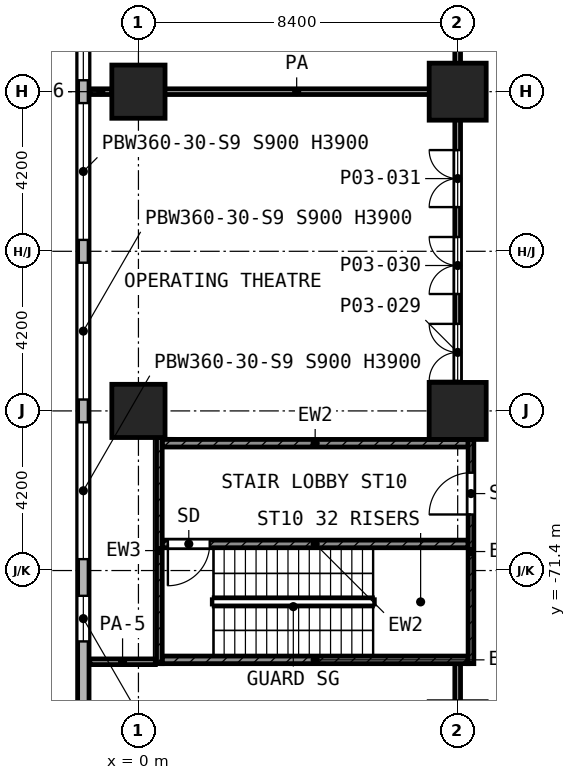
"""IFC4 building model, lengths in metres.
Left out: names, types, materials, properties, quantities, classifications, styles, units other than length and angle.
Written with IfcOpenShell. Run it as: python <this file> out.ifc"""

import sys

from ifc_helpers import new_model, si_unit, direction, frame, frame_2d, origin, origin_2d, place, context, subcontext, project, spatial, rectangle, extrude, element, fill, save


model = new_model("IFC4")
c1 = context("Model", 3, precision=1e-05, world=origin(), true_north=direction((0.0, 1.0)))
c2 = subcontext(c1, "Body", "Model", "MODEL_VIEW")
j1 = project(units=[si_unit("LENGTHUNIT", "METRE"), si_unit("PLANEANGLEUNIT", "RADIAN")], contexts=[c1])
p1 = place(None, origin())
s1 = spatial("IfcSite", under=j1, at=p1, CompositionType="ELEMENT")
p2 = place(p1, origin())
s2 = spatial("IfcBuilding", under=s1, at=p2, CompositionType="ELEMENT")
p3 = place(p2, frame((0.0, 0.0, 12.6)))
s3 = spatial("IfcBuildingStorey", under=s2, at=p3, CompositionType="ELEMENT", Elevation=12.6)
p4 = place(p3, frame((0.0, -58.8, 0.0), z_axis=(0.0, 0.0, 1.0), x_axis=(1.0, 0.0, 0.0)))
e1 = element("IfcColumn", 1, at=p4, inside=s3, PredefinedType="COLUMN", context=c2, shape_type="SweptSolid", body=[
    extrude(rectangle(XDim=1.4, YDim=1.4, at=origin_2d()), origin(), (0.0, 0.0, 1.0), 5.6),
])
p5 = place(p3, frame((8.4, -58.8, 0.0), z_axis=(0.0, 0.0, 1.0), x_axis=(1.0, 0.0, 0.0)))
e2 = element("IfcColumn", 2, at=p5, inside=s3, PredefinedType="COLUMN", context=c2, shape_type="SweptSolid", body=[
    extrude(rectangle(XDim=1.5, YDim=1.5, at=origin_2d()), origin(), (0.0, 0.0, 1.0), 5.6),
])
p6 = place(p3, frame((0.0, -67.2, 0.0), z_axis=(0.0, 0.0, 1.0), x_axis=(1.0, 0.0, 0.0)))
e3 = element("IfcColumn", 3, at=p6, inside=s3, PredefinedType="COLUMN", context=c2, shape_type="SweptSolid", body=[
    extrude(rectangle(XDim=1.4, YDim=1.4, at=origin_2d()), origin(), (0.0, 0.0, 1.0), 5.6),
])
p7 = place(p3, frame((8.4, -67.2, 0.0), z_axis=(0.0, 0.0, 1.0), x_axis=(1.0, 0.0, 0.0)))
e4 = element("IfcColumn", 4, at=p7, inside=s3, PredefinedType="COLUMN", context=c2, shape_type="SweptSolid", body=[
    extrude(rectangle(XDim=1.5, YDim=1.5, at=origin_2d()), origin(), (0.0, 0.0, 1.0), 5.6),
])
p8 = place(p3, frame((-1.45, -4.462, 0.0), z_axis=(0.0, 0.0, 1.0), x_axis=(0.0, -1.0, 0.0)))
e5 = element("IfcWall", 5, at=p8, inside=s3, PredefinedType="SOLIDWALL", context=c2, shape_type="SweptSolid", body=[
    extrude(rectangle(XDim=75.076, YDim=0.3, at=frame_2d((37.538, 0.0))), origin(), (0.0, 0.0, 1.0), 5.25),
])
p9 = place(p8, frame((0.738, 0.0, 0.9)))
e6 = element("IfcOpeningElement", 6, at=p9, cuts=e5, PredefinedType="OPENING", context=c2, shape_type="SweptSolid", body=[
    extrude(rectangle(XDim=2.4, YDim=3.0, at=frame_2d((1.2, 1.5))), frame((0.0, 0.16, 0.0), z_axis=(0.0, -1.0, 0.0), x_axis=(1.0, 0.0, 0.0)), (0.0, 0.0, 1.0), 0.32),
])
p10 = place(p8, frame((4.238, 0.0, 0.9)))
e7 = element("IfcOpeningElement", 7, at=p10, cuts=e5, PredefinedType="OPENING", context=c2, shape_type="SweptSolid", body=[
    extrude(rectangle(XDim=3.6, YDim=3.0, at=frame_2d((1.8, 1.5))), frame((0.0, 0.16, 0.0), z_axis=(0.0, -1.0, 0.0), x_axis=(1.0, 0.0, 0.0)), (0.0, 0.0, 1.0), 0.32),
])
p11 = place(p8, frame((8.438, 0.0, 0.9)))
e8 = element("IfcOpeningElement", 8, at=p11, cuts=e5, PredefinedType="OPENING", context=c2, shape_type="SweptSolid", body=[
    extrude(rectangle(XDim=3.6, YDim=3.0, at=frame_2d((1.8, 1.5))), frame((0.0, 0.16, 0.0), z_axis=(0.0, -1.0, 0.0), x_axis=(1.0, 0.0, 0.0)), (0.0, 0.0, 1.0), 0.32),
])
p12 = place(p8, frame((12.638, 0.0, 0.9)))
e9 = element("IfcOpeningElement", 9, at=p12, cuts=e5, PredefinedType="OPENING", context=c2, shape_type="SweptSolid", body=[
    extrude(rectangle(XDim=3.6, YDim=3.0, at=frame_2d((1.8, 1.5))), frame((0.0, 0.16, 0.0), z_axis=(0.0, -1.0, 0.0), x_axis=(1.0, 0.0, 0.0)), (0.0, 0.0, 1.0), 0.32),
])
p13 = place(p8, frame((16.838, 0.0, 0.9)))
e10 = element("IfcOpeningElement", 10, at=p13, cuts=e5, PredefinedType="OPENING", context=c2, shape_type="SweptSolid", body=[
    extrude(rectangle(XDim=3.6, YDim=3.0, at=frame_2d((1.8, 1.5))), frame((0.0, 0.16, 0.0), z_axis=(0.0, -1.0, 0.0), x_axis=(1.0, 0.0, 0.0)), (0.0, 0.0, 1.0), 0.32),
])
p14 = place(p8, frame((21.403, 0.0, 0.9)))
e11 = element("IfcOpeningElement", 11, at=p14, cuts=e5, PredefinedType="OPENING", context=c2, shape_type="SweptSolid", body=[
    extrude(rectangle(XDim=2.4, YDim=3.0, at=frame_2d((1.2, 1.5))), frame((0.0, 0.16, 0.0), z_axis=(0.0, -1.0, 0.0), x_axis=(1.0, 0.0, 0.0)), (0.0, 0.0, 1.0), 0.32),
])
p15 = place(p8, frame((25.238, 0.0, 0.9)))
e12 = element("IfcOpeningElement", 12, at=p15, cuts=e5, PredefinedType="OPENING", context=c2, shape_type="SweptSolid", body=[
    extrude(rectangle(XDim=3.6, YDim=3.0, at=frame_2d((1.8, 1.5))), frame((0.0, 0.16, 0.0), z_axis=(0.0, -1.0, 0.0), x_axis=(1.0, 0.0, 0.0)), (0.0, 0.0, 1.0), 0.32),
])
p16 = place(p8, frame((30.423, 0.0, 0.9)))
e13 = element("IfcOpeningElement", 13, at=p16, cuts=e5, PredefinedType="OPENING", context=c2, shape_type="SweptSolid", body=[
    extrude(rectangle(XDim=2.4, YDim=3.0, at=frame_2d((1.2, 1.5))), frame((0.0, 0.16, 0.0), z_axis=(0.0, -1.0, 0.0), x_axis=(1.0, 0.0, 0.0)), (0.0, 0.0, 1.0), 0.32),
])
p17 = place(p8, frame((33.638, 0.0, 0.9)))
e14 = element("IfcOpeningElement", 14, at=p17, cuts=e5, PredefinedType="OPENING", context=c2, shape_type="SweptSolid", body=[
    extrude(rectangle(XDim=3.6, YDim=3.0, at=frame_2d((1.8, 1.5))), frame((0.0, 0.16, 0.0), z_axis=(0.0, -1.0, 0.0), x_axis=(1.0, 0.0, 0.0)), (0.0, 0.0, 1.0), 0.32),
])
p18 = place(p8, frame((37.838, 0.0, 0.9)))
e15 = element("IfcOpeningElement", 15, at=p18, cuts=e5, PredefinedType="OPENING", context=c2, shape_type="SweptSolid", body=[
    extrude(rectangle(XDim=3.6, YDim=3.0, at=frame_2d((1.8, 1.5))), frame((0.0, 0.16, 0.0), z_axis=(0.0, -1.0, 0.0), x_axis=(1.0, 0.0, 0.0)), (0.0, 0.0, 1.0), 0.32),
])
p19 = place(p8, frame((42.038, 0.0, 0.9)))
e16 = element("IfcOpeningElement", 16, at=p19, cuts=e5, PredefinedType="OPENING", context=c2, shape_type="SweptSolid", body=[
    extrude(rectangle(XDim=3.6, YDim=3.0, at=frame_2d((1.8, 1.5))), frame((0.0, 0.16, 0.0), z_axis=(0.0, -1.0, 0.0), x_axis=(1.0, 0.0, 0.0)), (0.0, 0.0, 1.0), 0.32),
])
p20 = place(p8, frame((46.238, 0.0, 0.9)))
e17 = element("IfcOpeningElement", 17, at=p20, cuts=e5, PredefinedType="OPENING", context=c2, shape_type="SweptSolid", body=[
    extrude(rectangle(XDim=3.6, YDim=3.0, at=frame_2d((1.8, 1.5))), frame((0.0, 0.16, 0.0), z_axis=(0.0, -1.0, 0.0), x_axis=(1.0, 0.0, 0.0)), (0.0, 0.0, 1.0), 0.32),
])
p21 = place(p8, frame((50.438, 0.0, 0.9)))
e18 = element("IfcOpeningElement", 18, at=p21, cuts=e5, PredefinedType="OPENING", context=c2, shape_type="SweptSolid", body=[
    extrude(rectangle(XDim=3.6, YDim=3.0, at=frame_2d((1.8, 1.5))), frame((0.0, 0.16, 0.0), z_axis=(0.0, -1.0, 0.0), x_axis=(1.0, 0.0, 0.0)), (0.0, 0.0, 1.0), 0.32),
])
p22 = place(p8, frame((54.638, 0.0, 0.9)))
e19 = element("IfcOpeningElement", 19, at=p22, cuts=e5, PredefinedType="OPENING", context=c2, shape_type="SweptSolid", body=[
    extrude(rectangle(XDim=3.6, YDim=3.0, at=frame_2d((1.8, 1.5))), frame((0.0, 0.16, 0.0), z_axis=(0.0, -1.0, 0.0), x_axis=(1.0, 0.0, 0.0)), (0.0, 0.0, 1.0), 0.32),
])
p23 = place(p8, frame((58.838, 0.0, 0.9)))
e20 = element("IfcOpeningElement", 20, at=p23, cuts=e5, PredefinedType="OPENING", context=c2, shape_type="SweptSolid", body=[
    extrude(rectangle(XDim=3.6, YDim=3.0, at=frame_2d((1.8, 1.5))), frame((0.0, 0.16, 0.0), z_axis=(0.0, -1.0, 0.0), x_axis=(1.0, 0.0, 0.0)), (0.0, 0.0, 1.0), 0.32),
])
p24 = place(p8, frame((63.038, 0.0, 0.9)))
e21 = element("IfcOpeningElement", 21, at=p24, cuts=e5, PredefinedType="OPENING", context=c2, shape_type="SweptSolid", body=[
    extrude(rectangle(XDim=3.6, YDim=3.0, at=frame_2d((1.8, 1.5))), frame((0.0, 0.16, 0.0), z_axis=(0.0, -1.0, 0.0), x_axis=(1.0, 0.0, 0.0)), (0.0, 0.0, 1.0), 0.32),
])
p25 = place(p8, frame((67.603, 0.0, 0.9)))
e22 = element("IfcOpeningElement", 22, at=p25, cuts=e5, PredefinedType="OPENING", context=c2, shape_type="SweptSolid", body=[
    extrude(rectangle(XDim=1.2, YDim=3.0, at=frame_2d((0.6, 1.5))), frame((0.0, 0.16, 0.0), z_axis=(0.0, -1.0, 0.0), x_axis=(1.0, 0.0, 0.0)), (0.0, 0.0, 1.0), 0.32),
])
p26 = place(p8, frame((71.938, 0.0, 0.9)))
e23 = element("IfcOpeningElement", 23, at=p26, cuts=e5, PredefinedType="OPENING", context=c2, shape_type="SweptSolid", body=[
    extrude(rectangle(XDim=2.4, YDim=3.0, at=frame_2d((1.2, 1.5))), frame((0.0, 0.16, 0.0), z_axis=(0.0, -1.0, 0.0), x_axis=(1.0, 0.0, 0.0)), (0.0, 0.0, 1.0), 0.32),
])
p27 = place(p3, frame((0.55, -73.85, 0.0), z_axis=(0.0, 0.0, 1.0), x_axis=(0.0, 1.0, 0.0)))
e24 = element("IfcWall", 24, at=p27, inside=s3, PredefinedType="SHEAR", context=c2, shape_type="SweptSolid", body=[
    extrude(rectangle(XDim=5.95, YDim=0.15, at=frame_2d((2.975, 0.0))), origin(), (0.0, 0.0, 1.0), 5.25),
])
p28 = place(p3, frame((8.75, -73.85, 0.0), z_axis=(0.0, 0.0, 1.0), x_axis=(0.0, 1.0, 0.0)))
e25 = element("IfcWall", 25, at=p28, inside=s3, PredefinedType="SHEAR", context=c2, shape_type="SweptSolid", body=[
    extrude(rectangle(XDim=5.9, YDim=0.15, at=frame_2d((2.95, 0.0))), origin(), (0.0, 0.0, 1.0), 5.25),
])
p29 = place(p28, frame((3.925, 0.0, 0.0)))
e26 = element("IfcOpeningElement", 26, at=p29, cuts=e25, PredefinedType="OPENING", context=c2, shape_type="SweptSolid", body=[
    extrude(rectangle(XDim=1.1, YDim=2.1, at=frame_2d((0.55, 1.05))), frame((0.0, 0.085, 0.0), z_axis=(0.0, -1.0, 0.0), x_axis=(1.0, 0.0, 0.0)), (0.0, 0.0, 1.0), 0.17),
])
p30 = place(p3, frame((0.625, -73.75, 0.0), z_axis=(0.0, 0.0, 1.0), x_axis=(1.0, 0.0, 0.0)))
e27 = element("IfcWall", 27, at=p30, inside=s3, PredefinedType="SHEAR", context=c2, shape_type="SweptSolid", body=[
    extrude(rectangle(XDim=8.05, YDim=0.2, at=frame_2d((4.025, 0.0))), origin(), (0.0, 0.0, 1.0), 5.25),
])
p31 = place(p3, frame((0.625, -70.7, 0.0), z_axis=(0.0, 0.0, 1.0), x_axis=(1.0, 0.0, 0.0)))
e28 = element("IfcWall", 28, at=p31, inside=s3, PredefinedType="SHEAR", context=c2, shape_type="SweptSolid", body=[
    extrude(rectangle(XDim=8.05, YDim=0.2, at=frame_2d((4.025, 0.0))), origin(), (0.0, 0.0, 1.0), 5.25),
])
p32 = place(p31, frame((0.15, 0.0, 0.0)))
e29 = element("IfcOpeningElement", 29, at=p32, cuts=e28, PredefinedType="OPENING", context=c2, shape_type="SweptSolid", body=[
    extrude(rectangle(XDim=1.1, YDim=2.1, at=frame_2d((0.55, 1.05))), frame((0.0, 0.11, 0.0), z_axis=(0.0, -1.0, 0.0), x_axis=(1.0, 0.0, 0.0)), (0.0, 0.0, 1.0), 0.22),
])
p33 = place(p3, frame((0.625, -68.05, 0.0), z_axis=(0.0, 0.0, 1.0), x_axis=(1.0, 0.0, 0.0)))
e30 = element("IfcWall", 30, at=p33, inside=s3, PredefinedType="SHEAR", context=c2, shape_type="SweptSolid", body=[
    extrude(rectangle(XDim=8.05, YDim=0.2, at=frame_2d((4.025, 0.0))), origin(), (0.0, 0.0, 1.0), 5.25),
])
p34 = place(p3, frame((-1.28, -73.8, 0.0), z_axis=(0.0, 0.0, 1.0), x_axis=(1.0, 0.0, 0.0)))
e31 = element("IfcWall", 31, at=p34, inside=s3, PredefinedType="PARTITIONING", context=c2, shape_type="SweptSolid", body=[
    extrude(rectangle(XDim=1.725, YDim=0.15, at=frame_2d((0.863, 0.0))), origin(), (0.0, 0.0, 1.0), 3.85),
])
p35 = place(p3, frame((-1.28, -58.8, 0.0), z_axis=(0.0, 0.0, 1.0), x_axis=(1.0, 0.0, 0.0)))
e32 = element("IfcWall", 32, at=p35, inside=s3, PredefinedType="PARTITIONING", context=c2, shape_type="SweptSolid", body=[
    extrude(rectangle(XDim=0.58, YDim=0.15, at=frame_2d((0.29, 0.0))), origin(), (0.0, 0.0, 1.0), 4.35),
])
p36 = place(p3, frame((0.002, -58.8, 0.0), z_axis=(0.0, 0.0, 1.0), x_axis=(1.0, 0.0, 0.0)))
e33 = element("IfcWall", 33, at=p36, inside=s3, PredefinedType="PARTITIONING", context=c2, shape_type="SweptSolid", body=[
    extrude(rectangle(XDim=8.323, YDim=0.15, at=frame_2d((4.162, 0.0))), origin(), (0.0, 0.0, 1.0), 5.25),
])
p37 = place(p3, frame((8.4, -85.28, 0.0), z_axis=(0.0, 0.0, 1.0), x_axis=(0.0, 1.0, 0.0)))
e34 = element("IfcWall", 34, at=p37, inside=s3, PredefinedType="PARTITIONING", context=c2, shape_type="SweptSolid", body=[
    extrude(rectangle(XDim=11.43, YDim=0.15, at=frame_2d((5.715, 0.0))), origin(), (0.0, 0.0, 1.0), 3.85),
])
p38 = place(p37, frame((5.055, 0.0, 0.0)))
e35 = element("IfcOpeningElement", 35, at=p38, cuts=e34, PredefinedType="OPENING", context=c2, shape_type="SweptSolid", body=[
    extrude(rectangle(XDim=1.0, YDim=2.1, at=frame_2d((0.5, 1.05))), frame((0.0, 0.085, 0.0), z_axis=(0.0, -1.0, 0.0), x_axis=(1.0, 0.0, 0.0)), (0.0, 0.0, 1.0), 0.17),
])
p39 = place(p3, frame((8.4, -67.947, 0.0), z_axis=(0.0, 0.0, 1.0), x_axis=(0.0, 1.0, 0.0)))
e36 = element("IfcWall", 36, at=p39, inside=s3, PredefinedType="PARTITIONING", context=c2, shape_type="SweptSolid", body=[
    extrude(rectangle(XDim=25.597, YDim=0.15, at=frame_2d((12.798, 0.0))), origin(), (0.0, 0.0, 1.0), 5.25),
])
p40 = place(p39, frame((18.809, 0.0, 0.0)))
e37 = element("IfcOpeningElement", 37, at=p40, cuts=e36, PredefinedType="OPENING", context=c2, shape_type="SweptSolid", body=[
    extrude(rectangle(XDim=1.5, YDim=2.1, at=frame_2d((0.75, 1.05))), frame((0.0, 0.085, 0.0), z_axis=(0.0, -1.0, 0.0), x_axis=(1.0, 0.0, 0.0)), (0.0, 0.0, 1.0), 0.17),
])
p41 = place(p39, frame((20.822, 0.0, 0.0)))
e38 = element("IfcOpeningElement", 38, at=p41, cuts=e36, PredefinedType="OPENING", context=c2, shape_type="SweptSolid", body=[
    extrude(rectangle(XDim=1.5, YDim=2.1, at=frame_2d((0.75, 1.05))), frame((0.0, 0.085, 0.0), z_axis=(0.0, -1.0, 0.0), x_axis=(1.0, 0.0, 0.0)), (0.0, 0.0, 1.0), 0.17),
])
p42 = place(p39, frame((22.835, 0.0, 0.0)))
e39 = element("IfcOpeningElement", 39, at=p42, cuts=e36, PredefinedType="OPENING", context=c2, shape_type="SweptSolid", body=[
    extrude(rectangle(XDim=1.5, YDim=2.1, at=frame_2d((0.75, 1.05))), frame((0.0, 0.085, 0.0), z_axis=(0.0, -1.0, 0.0), x_axis=(1.0, 0.0, 0.0)), (0.0, 0.0, 1.0), 0.17),
])
p43 = place(p39, frame((10.497, 0.0, 0.0)))
e40 = element("IfcOpeningElement", 40, at=p43, cuts=e36, PredefinedType="OPENING", context=c2, shape_type="SweptSolid", body=[
    extrude(rectangle(XDim=1.5, YDim=2.1, at=frame_2d((0.75, 1.05))), frame((0.0, 0.085, 0.0), z_axis=(0.0, -1.0, 0.0), x_axis=(1.0, 0.0, 0.0)), (0.0, 0.0, 1.0), 0.17),
])
p44 = place(p39, frame((12.597, 0.0, 0.0)))
e41 = element("IfcOpeningElement", 41, at=p44, cuts=e36, PredefinedType="OPENING", context=c2, shape_type="SweptSolid", body=[
    extrude(rectangle(XDim=1.5, YDim=2.1, at=frame_2d((0.75, 1.05))), frame((0.0, 0.085, 0.0), z_axis=(0.0, -1.0, 0.0), x_axis=(1.0, 0.0, 0.0)), (0.0, 0.0, 1.0), 0.17),
])
p45 = place(p39, frame((14.697, 0.0, 0.0)))
e42 = element("IfcOpeningElement", 42, at=p45, cuts=e36, PredefinedType="OPENING", context=c2, shape_type="SweptSolid", body=[
    extrude(rectangle(XDim=1.5, YDim=2.1, at=frame_2d((0.75, 1.05))), frame((0.0, 0.085, 0.0), z_axis=(0.0, -1.0, 0.0), x_axis=(1.0, 0.0, 0.0)), (0.0, 0.0, 1.0), 0.17),
])
p46 = place(p39, frame((1.537, 0.0, 0.0)))
e43 = element("IfcOpeningElement", 43, at=p46, cuts=e36, PredefinedType="OPENING", context=c2, shape_type="SweptSolid", body=[
    extrude(rectangle(XDim=1.5, YDim=2.1, at=frame_2d((0.75, 1.05))), frame((0.0, 0.085, 0.0), z_axis=(0.0, -1.0, 0.0), x_axis=(1.0, 0.0, 0.0)), (0.0, 0.0, 1.0), 0.17),
])
p47 = place(p39, frame((3.823, 0.0, 0.0)))
e44 = element("IfcOpeningElement", 44, at=p47, cuts=e36, PredefinedType="OPENING", context=c2, shape_type="SweptSolid", body=[
    extrude(rectangle(XDim=1.5, YDim=2.1, at=frame_2d((0.75, 1.05))), frame((0.0, 0.085, 0.0), z_axis=(0.0, -1.0, 0.0), x_axis=(1.0, 0.0, 0.0)), (0.0, 0.0, 1.0), 0.17),
])
p48 = place(p39, frame((6.11, 0.0, 0.0)))
e45 = element("IfcOpeningElement", 45, at=p48, cuts=e36, PredefinedType="OPENING", context=c2, shape_type="SweptSolid", body=[
    extrude(rectangle(XDim=1.5, YDim=2.1, at=frame_2d((0.75, 1.05))), frame((0.0, 0.085, 0.0), z_axis=(0.0, -1.0, 0.0), x_axis=(1.0, 0.0, 0.0)), (0.0, 0.0, 1.0), 0.17),
])
p49 = place(p21, origin())
e46 = element("IfcWindow", 46, at=p49, inside=s3, PartitioningType="SINGLE_PANEL", PredefinedType="WINDOW", context=c2, shape_type="SweptSolid", body=[
    extrude(rectangle(XDim=3.6, YDim=3.0, at=frame_2d((1.8, 1.5))), frame((0.0, 0.03, 0.0), z_axis=(0.0, -1.0, 0.0), x_axis=(1.0, 0.0, 0.0)), (0.0, 0.0, 1.0), 0.06),
])
fill(e18, e46)
p50 = place(p22, origin())
e47 = element("IfcWindow", 47, at=p50, inside=s3, PartitioningType="SINGLE_PANEL", PredefinedType="WINDOW", context=c2, shape_type="SweptSolid", body=[
    extrude(rectangle(XDim=3.6, YDim=3.0, at=frame_2d((1.8, 1.5))), frame((0.0, 0.03, 0.0), z_axis=(0.0, -1.0, 0.0), x_axis=(1.0, 0.0, 0.0)), (0.0, 0.0, 1.0), 0.06),
])
fill(e19, e47)
p51 = place(p23, origin())
e48 = element("IfcWindow", 48, at=p51, inside=s3, PartitioningType="SINGLE_PANEL", PredefinedType="WINDOW", context=c2, shape_type="SweptSolid", body=[
    extrude(rectangle(XDim=3.6, YDim=3.0, at=frame_2d((1.8, 1.5))), frame((0.0, 0.03, 0.0), z_axis=(0.0, -1.0, 0.0), x_axis=(1.0, 0.0, 0.0)), (0.0, 0.0, 1.0), 0.06),
])
fill(e20, e48)
p52 = place(p24, origin())
e49 = element("IfcWindow", 49, at=p52, inside=s3, PartitioningType="SINGLE_PANEL", PredefinedType="WINDOW", context=c2, shape_type="SweptSolid", body=[
    extrude(rectangle(XDim=3.6, YDim=3.0, at=frame_2d((1.8, 1.5))), frame((0.0, 0.03, 0.0), z_axis=(0.0, -1.0, 0.0), x_axis=(1.0, 0.0, 0.0)), (0.0, 0.0, 1.0), 0.06),
])
fill(e21, e49)
p53 = place(p25, origin())
e50 = element("IfcWindow", 50, at=p53, inside=s3, PartitioningType="SINGLE_PANEL", PredefinedType="WINDOW", context=c2, shape_type="SweptSolid", body=[
    extrude(rectangle(XDim=1.2, YDim=3.0, at=frame_2d((0.6, 1.5))), frame((0.0, 0.03, 0.0), z_axis=(0.0, -1.0, 0.0), x_axis=(1.0, 0.0, 0.0)), (0.0, 0.0, 1.0), 0.06),
])
fill(e22, e50)
p54 = place(p32, frame((1.1, 0.0, 0.0), z_axis=(0.0, 0.0, 1.0), x_axis=(-1.0, 0.0, 0.0)))
e51 = element("IfcDoor", 51, at=p54, inside=s3, OperationType="SINGLE_SWING_LEFT", PredefinedType="DOOR", context=c2, shape_type="SweptSolid", body=[
    extrude(rectangle(XDim=1.1, YDim=2.1, at=frame_2d((0.55, 1.05))), frame((0.0, 0.025, 0.0), z_axis=(0.0, -1.0, 0.0), x_axis=(1.0, 0.0, 0.0)), (0.0, 0.0, 1.0), 0.05),
])
fill(e29, e51)
p55 = place(p29, origin())
e52 = element("IfcDoor", 52, at=p55, inside=s3, OperationType="SINGLE_SWING_LEFT", PredefinedType="DOOR", context=c2, shape_type="SweptSolid", body=[
    extrude(rectangle(XDim=1.1, YDim=2.1, at=frame_2d((0.55, 1.05))), frame((0.0, 0.025, 0.0), z_axis=(0.0, -1.0, 0.0), x_axis=(1.0, 0.0, 0.0)), (0.0, 0.0, 1.0), 0.05),
])
fill(e26, e52)
p56 = place(p46, origin())
e53 = element("IfcDoor", 53, at=p56, inside=s3, OperationType="DOUBLE_DOOR_SINGLE_SWING", PredefinedType="DOOR", context=c2, shape_type="SweptSolid", body=[
    extrude(rectangle(XDim=1.5, YDim=2.1, at=frame_2d((0.75, 1.05))), frame((0.0, 0.025, 0.0), z_axis=(0.0, -1.0, 0.0), x_axis=(1.0, 0.0, 0.0)), (0.0, 0.0, 1.0), 0.05),
])
fill(e43, e53)
p57 = place(p47, origin())
e54 = element("IfcDoor", 54, at=p57, inside=s3, OperationType="DOUBLE_DOOR_SINGLE_SWING", PredefinedType="DOOR", context=c2, shape_type="SweptSolid", body=[
    extrude(rectangle(XDim=1.5, YDim=2.1, at=frame_2d((0.75, 1.05))), frame((0.0, 0.025, 0.0), z_axis=(0.0, -1.0, 0.0), x_axis=(1.0, 0.0, 0.0)), (0.0, 0.0, 1.0), 0.05),
])
fill(e44, e54)
p58 = place(p48, origin())
e55 = element("IfcDoor", 55, at=p58, inside=s3, OperationType="DOUBLE_DOOR_SINGLE_SWING", PredefinedType="DOOR", context=c2, shape_type="SweptSolid", body=[
    extrude(rectangle(XDim=1.5, YDim=2.1, at=frame_2d((0.75, 1.05))), frame((0.0, 0.025, 0.0), z_axis=(0.0, -1.0, 0.0), x_axis=(1.0, 0.0, 0.0)), (0.0, 0.0, 1.0), 0.05),
])
fill(e45, e55)
save(model, sys.argv[1])
